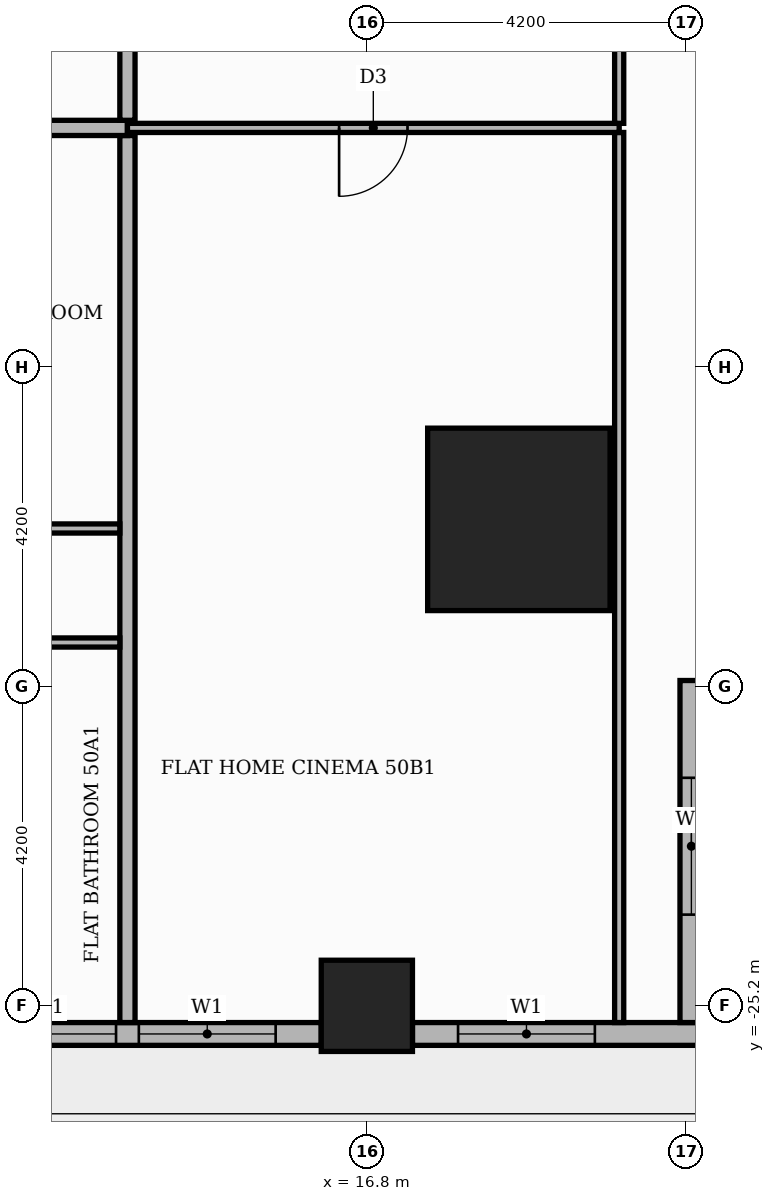
"""IFC4 building model, lengths in metres.
Left out: names, types, materials, properties, quantities, classifications, styles, units other than length and angle.
Written with IfcOpenShell. Run it as: python <this file> out.ifc"""

import sys

from ifc_helpers import new_model, si_unit, direction, frame, frame_2d, origin, origin_2d, place, context, subcontext, project, spatial, rectangle, extrude, element, fill, save


model = new_model("IFC4")
c1 = context("Model", 3, precision=1e-05, world=origin(), true_north=direction((0.0, 1.0)))
c2 = subcontext(c1, "Body", "Model", "MODEL_VIEW")
j1 = project(units=[si_unit("LENGTHUNIT", "METRE"), si_unit("PLANEANGLEUNIT", "RADIAN")], contexts=[c1])
p1 = place(None, origin())
s1 = spatial("IfcSite", under=j1, at=p1, CompositionType="ELEMENT")
p2 = place(p1, origin())
s2 = spatial("IfcBuilding", under=s1, at=p2, CompositionType="ELEMENT")
p3 = place(p2, frame((0.0, 0.0, 211.8)))
s3 = spatial("IfcBuildingStorey", under=s2, at=p3, CompositionType="ELEMENT", Elevation=211.8)
p4 = place(p3, frame((18.8, -18.8, 0.0), z_axis=(0.0, 0.0, 1.0), x_axis=(1.0, 0.0, 0.0)))
e1 = element("IfcColumn", 1, at=p4, inside=s3, PredefinedType="COLUMN", context=c2, shape_type="SweptSolid", body=[
    extrude(rectangle(XDim=2.4, YDim=2.4, at=origin_2d()), origin(), (0.0, 0.0, 1.0), 3.9),
])
p5 = place(p3, frame((16.8, -25.2, 0.0), z_axis=(0.0, 0.0, 1.0), x_axis=(1.0, 0.0, 0.0)))
e2 = element("IfcColumn", 2, at=p5, inside=s3, PredefinedType="COLUMN", context=c2, shape_type="SweptSolid", body=[
    extrude(rectangle(XDim=1.2, YDim=1.2, at=origin_2d()), origin(), (0.0, 0.0, 1.0), 3.9),
])
p6 = place(p3, frame((9.0, -25.57, 0.0), z_axis=(0.0, 0.0, 1.0), x_axis=(1.0, 0.0, 0.0)))
e3 = element("IfcWall", 3, at=p6, inside=s3, PredefinedType="STANDARD", context=c2, shape_type="SweptSolid", body=[
    extrude(rectangle(XDim=7.2, YDim=0.3, at=frame_2d((3.6, 0.0))), origin(), (0.0, 0.0, 1.0), 3.48),
])
p7 = place(p6, frame((0.6, 0.0, 0.9)))
e4 = element("IfcOpeningElement", 4, at=p7, cuts=e3, PredefinedType="OPENING", context=c2, shape_type="SweptSolid", body=[
    extrude(rectangle(XDim=1.8, YDim=2.1, at=frame_2d((0.9, 1.05))), frame((0.0, 0.16, 0.0), z_axis=(0.0, -1.0, 0.0), x_axis=(1.0, 0.0, 0.0)), (0.0, 0.0, 1.0), 0.32),
])
p8 = place(p6, frame((2.7, 0.0, 0.9)))
e5 = element("IfcOpeningElement", 5, at=p8, cuts=e3, PredefinedType="OPENING", context=c2, shape_type="SweptSolid", body=[
    extrude(rectangle(XDim=1.8, YDim=2.1, at=frame_2d((0.9, 1.05))), frame((0.0, 0.16, 0.0), z_axis=(0.0, -1.0, 0.0), x_axis=(1.0, 0.0, 0.0)), (0.0, 0.0, 1.0), 0.32),
])
p9 = place(p6, frame((4.8, 0.0, 0.9)))
e6 = element("IfcOpeningElement", 6, at=p9, cuts=e3, PredefinedType="OPENING", context=c2, shape_type="SweptSolid", body=[
    extrude(rectangle(XDim=1.8, YDim=2.1, at=frame_2d((0.9, 1.05))), frame((0.0, 0.16, 0.0), z_axis=(0.0, -1.0, 0.0), x_axis=(1.0, 0.0, 0.0)), (0.0, 0.0, 1.0), 0.32),
])
p10 = place(p3, frame((17.4, -25.57, 0.0), z_axis=(0.0, 0.0, 1.0), x_axis=(1.0, 0.0, 0.0)))
e7 = element("IfcWall", 7, at=p10, inside=s3, PredefinedType="STANDARD", context=c2, shape_type="SweptSolid", body=[
    extrude(rectangle(XDim=3.82, YDim=0.3, at=frame_2d((1.91, 0.0))), origin(), (0.0, 0.0, 1.0), 3.48),
])
p11 = place(p10, frame((0.6, 0.0, 0.9)))
e8 = element("IfcOpeningElement", 8, at=p11, cuts=e7, PredefinedType="OPENING", context=c2, shape_type="SweptSolid", body=[
    extrude(rectangle(XDim=1.8, YDim=2.1, at=frame_2d((0.9, 1.05))), frame((0.0, 0.16, 0.0), z_axis=(0.0, -1.0, 0.0), x_axis=(1.0, 0.0, 0.0)), (0.0, 0.0, 1.0), 0.32),
])
p12 = place(p3, frame((21.07, -25.42, 0.0), z_axis=(0.0, 0.0, 1.0), x_axis=(0.0, 1.0, 0.0)))
e9 = element("IfcWall", 9, at=p12, inside=s3, PredefinedType="STANDARD", context=c2, shape_type="SweptSolid", body=[
    extrude(rectangle(XDim=4.5, YDim=0.3, at=frame_2d((2.25, 0.0))), origin(), (0.0, 0.0, 1.0), 3.48),
])
p13 = place(p12, frame((1.42, 0.0, 0.9)))
e10 = element("IfcOpeningElement", 10, at=p13, cuts=e9, PredefinedType="OPENING", context=c2, shape_type="SweptSolid", body=[
    extrude(rectangle(XDim=1.8, YDim=2.1, at=frame_2d((0.9, 1.05))), frame((0.0, 0.16, 0.0), z_axis=(0.0, -1.0, 0.0), x_axis=(1.0, 0.0, 0.0)), (0.0, 0.0, 1.0), 0.32),
])
p14 = place(p3, frame((13.65, -25.42, 0.0), z_axis=(0.0, 0.0, 1.0), x_axis=(0.0, 1.0, 0.0)))
e11 = element("IfcWall", 11, at=p14, inside=s3, PredefinedType="PARTITIONING", context=c2, shape_type="SweptSolid", body=[
    extrude(rectangle(XDim=11.67, YDim=0.2, at=frame_2d((5.835, 0.0))), origin(), (0.0, 0.0, 1.0), 3.48),
])
p15 = place(p3, frame((20.12, -25.42, 0.0), z_axis=(0.0, 0.0, 1.0), x_axis=(0.0, 1.0, 0.0)))
e12 = element("IfcWall", 12, at=p15, inside=s3, PredefinedType="PARTITIONING", context=c2, shape_type="SweptSolid", body=[
    extrude(rectangle(XDim=11.71, YDim=0.12, at=frame_2d((5.855, 0.0))), origin(), (0.0, 0.0, 1.0), 3.48),
])
p16 = place(p3, frame((-21.219, -20.42, 0.0), z_axis=(0.0, 0.0, 1.0), x_axis=(1.0, 0.0, 0.0)))
e13 = element("IfcWall", 13, at=p16, inside=s3, PredefinedType="PARTITIONING", context=c2, shape_type="SweptSolid", body=[
    extrude(rectangle(XDim=34.769, YDim=0.12, at=frame_2d((17.385, 0.0))), origin(), (0.0, 0.0, 1.0), 3.48),
])
p17 = place(p16, frame((6.019, 0.0, 0.0)))
e14 = element("IfcOpeningElement", 14, at=p17, cuts=e13, PredefinedType="OPENING", context=c2, shape_type="SweptSolid", body=[
    extrude(rectangle(XDim=1.0, YDim=2.1, at=frame_2d((0.5, 1.05))), frame((0.0, 0.07, 0.0), z_axis=(0.0, -1.0, 0.0), x_axis=(1.0, 0.0, 0.0)), (0.0, 0.0, 1.0), 0.14),
])
p18 = place(p16, frame((11.269, 0.0, 0.0)))
e15 = element("IfcOpeningElement", 15, at=p18, cuts=e13, PredefinedType="OPENING", context=c2, shape_type="SweptSolid", body=[
    extrude(rectangle(XDim=1.0, YDim=2.1, at=frame_2d((0.5, 1.05))), frame((0.0, 0.07, 0.0), z_axis=(0.0, -1.0, 0.0), x_axis=(1.0, 0.0, 0.0)), (0.0, 0.0, 1.0), 0.14),
])
p19 = place(p16, frame((19.719, 0.0, 0.0)))
e16 = element("IfcOpeningElement", 16, at=p19, cuts=e13, PredefinedType="OPENING", context=c2, shape_type="SweptSolid", body=[
    extrude(rectangle(XDim=0.9, YDim=2.1, at=frame_2d((0.45, 1.05))), frame((0.0, 0.07, 0.0), z_axis=(0.0, -1.0, 0.0), x_axis=(1.0, 0.0, 0.0)), (0.0, 0.0, 1.0), 0.14),
])
p20 = place(p16, frame((30.219, 0.0, 0.0)))
e17 = element("IfcOpeningElement", 17, at=p20, cuts=e13, PredefinedType="OPENING", context=c2, shape_type="SweptSolid", body=[
    extrude(rectangle(XDim=0.9, YDim=2.1, at=frame_2d((0.45, 1.05))), frame((0.0, 0.07, 0.0), z_axis=(0.0, -1.0, 0.0), x_axis=(1.0, 0.0, 0.0)), (0.0, 0.0, 1.0), 0.14),
])
p21 = place(p3, frame((-9.45, -18.92, 0.0), z_axis=(0.0, 0.0, 1.0), x_axis=(1.0, 0.0, 0.0)))
e18 = element("IfcWall", 18, at=p21, inside=s3, PredefinedType="PARTITIONING", context=c2, shape_type="SweptSolid", body=[
    extrude(rectangle(XDim=23.0, YDim=0.12, at=frame_2d((11.5, 0.0))), origin(), (0.0, 0.0, 1.0), 3.48),
])
p22 = place(p21, frame((2.7, 0.0, 0.0)))
e19 = element("IfcOpeningElement", 19, at=p22, cuts=e18, PredefinedType="OPENING", context=c2, shape_type="SweptSolid", body=[
    extrude(rectangle(XDim=0.9, YDim=2.1, at=frame_2d((0.45, 1.05))), frame((0.0, 0.07, 0.0), z_axis=(0.0, -1.0, 0.0), x_axis=(1.0, 0.0, 0.0)), (0.0, 0.0, 1.0), 0.14),
])
p23 = place(p21, frame((7.8, 0.0, 0.0)))
e20 = element("IfcOpeningElement", 20, at=p23, cuts=e18, PredefinedType="OPENING", context=c2, shape_type="SweptSolid", body=[
    extrude(rectangle(XDim=0.9, YDim=2.1, at=frame_2d((0.45, 1.05))), frame((0.0, 0.07, 0.0), z_axis=(0.0, -1.0, 0.0), x_axis=(1.0, 0.0, 0.0)), (0.0, 0.0, 1.0), 0.14),
])
p24 = place(p21, frame((13.05, 0.0, 0.0)))
e21 = element("IfcOpeningElement", 21, at=p24, cuts=e18, PredefinedType="OPENING", context=c2, shape_type="SweptSolid", body=[
    extrude(rectangle(XDim=0.9, YDim=2.1, at=frame_2d((0.45, 1.05))), frame((0.0, 0.07, 0.0), z_axis=(0.0, -1.0, 0.0), x_axis=(1.0, 0.0, 0.0)), (0.0, 0.0, 1.0), 0.14),
])
p25 = place(p21, frame((17.475, 0.0, 0.0)))
e22 = element("IfcOpeningElement", 22, at=p25, cuts=e18, PredefinedType="OPENING", context=c2, shape_type="SweptSolid", body=[
    extrude(rectangle(XDim=0.9, YDim=2.1, at=frame_2d((0.45, 1.05))), frame((0.0, 0.07, 0.0), z_axis=(0.0, -1.0, 0.0), x_axis=(1.0, 0.0, 0.0)), (0.0, 0.0, 1.0), 0.14),
])
p26 = place(p21, frame((20.625, 0.0, 0.0)))
e23 = element("IfcOpeningElement", 23, at=p26, cuts=e18, PredefinedType="OPENING", context=c2, shape_type="SweptSolid", body=[
    extrude(rectangle(XDim=0.9, YDim=2.1, at=frame_2d((0.45, 1.05))), frame((0.0, 0.07, 0.0), z_axis=(0.0, -1.0, 0.0), x_axis=(1.0, 0.0, 0.0)), (0.0, 0.0, 1.0), 0.14),
])
p27 = place(p3, frame((-25.42, -13.65, 0.0), z_axis=(0.0, 0.0, 1.0), x_axis=(1.0, 0.0, 0.0)))
e24 = element("IfcWall", 24, at=p27, inside=s3, PredefinedType="PARTITIONING", context=c2, shape_type="SweptSolid", body=[
    extrude(rectangle(XDim=39.07, YDim=0.2, at=frame_2d((19.535, 0.0))), origin(), (0.0, 0.0, 1.0), 3.48),
])
p28 = place(p27, frame((13.32, 0.0, 0.0)))
e25 = element("IfcOpeningElement", 25, at=p28, cuts=e24, PredefinedType="OPENING", context=c2, shape_type="SweptSolid", body=[
    extrude(rectangle(XDim=1.1, YDim=2.4, at=frame_2d((0.55, 1.2))), frame((0.0, 0.11, 0.0), z_axis=(0.0, -1.0, 0.0), x_axis=(1.0, 0.0, 0.0)), (0.0, 0.0, 1.0), 0.22),
])
p29 = place(p3, frame((13.65, -13.65, 0.0), z_axis=(0.0, 0.0, 1.0), x_axis=(1.0, 0.0, 0.0)))
e26 = element("IfcWall", 26, at=p29, inside=s3, PredefinedType="PARTITIONING", context=c2, shape_type="SweptSolid", body=[
    extrude(rectangle(XDim=6.47, YDim=0.12, at=frame_2d((3.235, 0.0))), origin(), (0.0, 0.0, 1.0), 3.48),
])
p30 = place(p29, frame((2.785, 0.0, 0.0)))
e27 = element("IfcOpeningElement", 27, at=p30, cuts=e26, PredefinedType="OPENING", context=c2, shape_type="SweptSolid", body=[
    extrude(rectangle(XDim=0.9, YDim=2.1, at=frame_2d((0.45, 1.05))), frame((0.0, 0.07, 0.0), z_axis=(0.0, -1.0, 0.0), x_axis=(1.0, 0.0, 0.0)), (0.0, 0.0, 1.0), 0.14),
])
p31 = place(p3, frame((20.12, -13.59, 0.0), z_axis=(0.0, 0.0, 1.0), x_axis=(0.0, 1.0, 0.0)))
e28 = element("IfcWall", 28, at=p31, inside=s3, PredefinedType="PARTITIONING", context=c2, shape_type="SweptSolid", body=[
    extrude(rectangle(XDim=4.08, YDim=0.12, at=frame_2d((2.04, 0.0))), origin(), (0.0, 0.0, 1.0), 3.48),
])
p32 = place(p31, frame((1.54, 0.0, 0.0)))
e29 = element("IfcOpeningElement", 29, at=p32, cuts=e28, PredefinedType="OPENING", context=c2, shape_type="SweptSolid", body=[
    extrude(rectangle(XDim=1.0, YDim=2.1, at=frame_2d((0.5, 1.05))), frame((0.0, 0.07, 0.0), z_axis=(0.0, -1.0, 0.0), x_axis=(1.0, 0.0, 0.0)), (0.0, 0.0, 1.0), 0.14),
])
p33 = place(p3, frame((13.65, -13.55, 0.0), z_axis=(0.0, 0.0, 1.0), x_axis=(0.0, 1.0, 0.0)))
e30 = element("IfcWall", 30, at=p33, inside=s3, PredefinedType="PARTITIONING", context=c2, shape_type="SweptSolid", body=[
    extrude(rectangle(XDim=2.45, YDim=0.2, at=frame_2d((1.225, 0.0))), origin(), (0.0, 0.0, 1.0), 3.48),
])
p34 = place(p8, origin())
e31 = element("IfcWindow", 31, at=p34, inside=s3, PartitioningType="SINGLE_PANEL", PredefinedType="WINDOW", context=c2, shape_type="SweptSolid", body=[
    extrude(rectangle(XDim=1.8, YDim=2.1, at=frame_2d((0.9, 1.05))), frame((0.0, 0.03, 0.0), z_axis=(0.0, -1.0, 0.0), x_axis=(1.0, 0.0, 0.0)), (0.0, 0.0, 1.0), 0.06),
])
fill(e5, e31)
p35 = place(p9, origin())
e32 = element("IfcWindow", 32, at=p35, inside=s3, PartitioningType="SINGLE_PANEL", PredefinedType="WINDOW", context=c2, shape_type="SweptSolid", body=[
    extrude(rectangle(XDim=1.8, YDim=2.1, at=frame_2d((0.9, 1.05))), frame((0.0, 0.03, 0.0), z_axis=(0.0, -1.0, 0.0), x_axis=(1.0, 0.0, 0.0)), (0.0, 0.0, 1.0), 0.06),
])
fill(e6, e32)
p36 = place(p11, origin())
e33 = element("IfcWindow", 33, at=p36, inside=s3, PartitioningType="SINGLE_PANEL", PredefinedType="WINDOW", context=c2, shape_type="SweptSolid", body=[
    extrude(rectangle(XDim=1.8, YDim=2.1, at=frame_2d((0.9, 1.05))), frame((0.0, 0.03, 0.0), z_axis=(0.0, -1.0, 0.0), x_axis=(1.0, 0.0, 0.0)), (0.0, 0.0, 1.0), 0.06),
])
fill(e8, e33)
p37 = place(p13, origin())
e34 = element("IfcWindow", 34, at=p37, inside=s3, PartitioningType="SINGLE_PANEL", PredefinedType="WINDOW", context=c2, shape_type="SweptSolid", body=[
    extrude(rectangle(XDim=1.8, YDim=2.1, at=frame_2d((0.9, 1.05))), frame((0.0, 0.03, 0.0), z_axis=(0.0, -1.0, 0.0), x_axis=(1.0, 0.0, 0.0)), (0.0, 0.0, 1.0), 0.06),
])
fill(e10, e34)
p38 = place(p30, frame((0.9, 0.0, 0.0), z_axis=(0.0, 0.0, 1.0), x_axis=(-1.0, 0.0, 0.0)))
e35 = element("IfcDoor", 35, at=p38, inside=s3, OperationType="SINGLE_SWING_LEFT", PredefinedType="DOOR", context=c2, shape_type="SweptSolid", body=[
    extrude(rectangle(XDim=0.9, YDim=2.1, at=frame_2d((0.45, 1.05))), frame((0.0, 0.025, 0.0), z_axis=(0.0, -1.0, 0.0), x_axis=(1.0, 0.0, 0.0)), (0.0, 0.0, 1.0), 0.05),
])
fill(e27, e35)
save(model, sys.argv[1])
